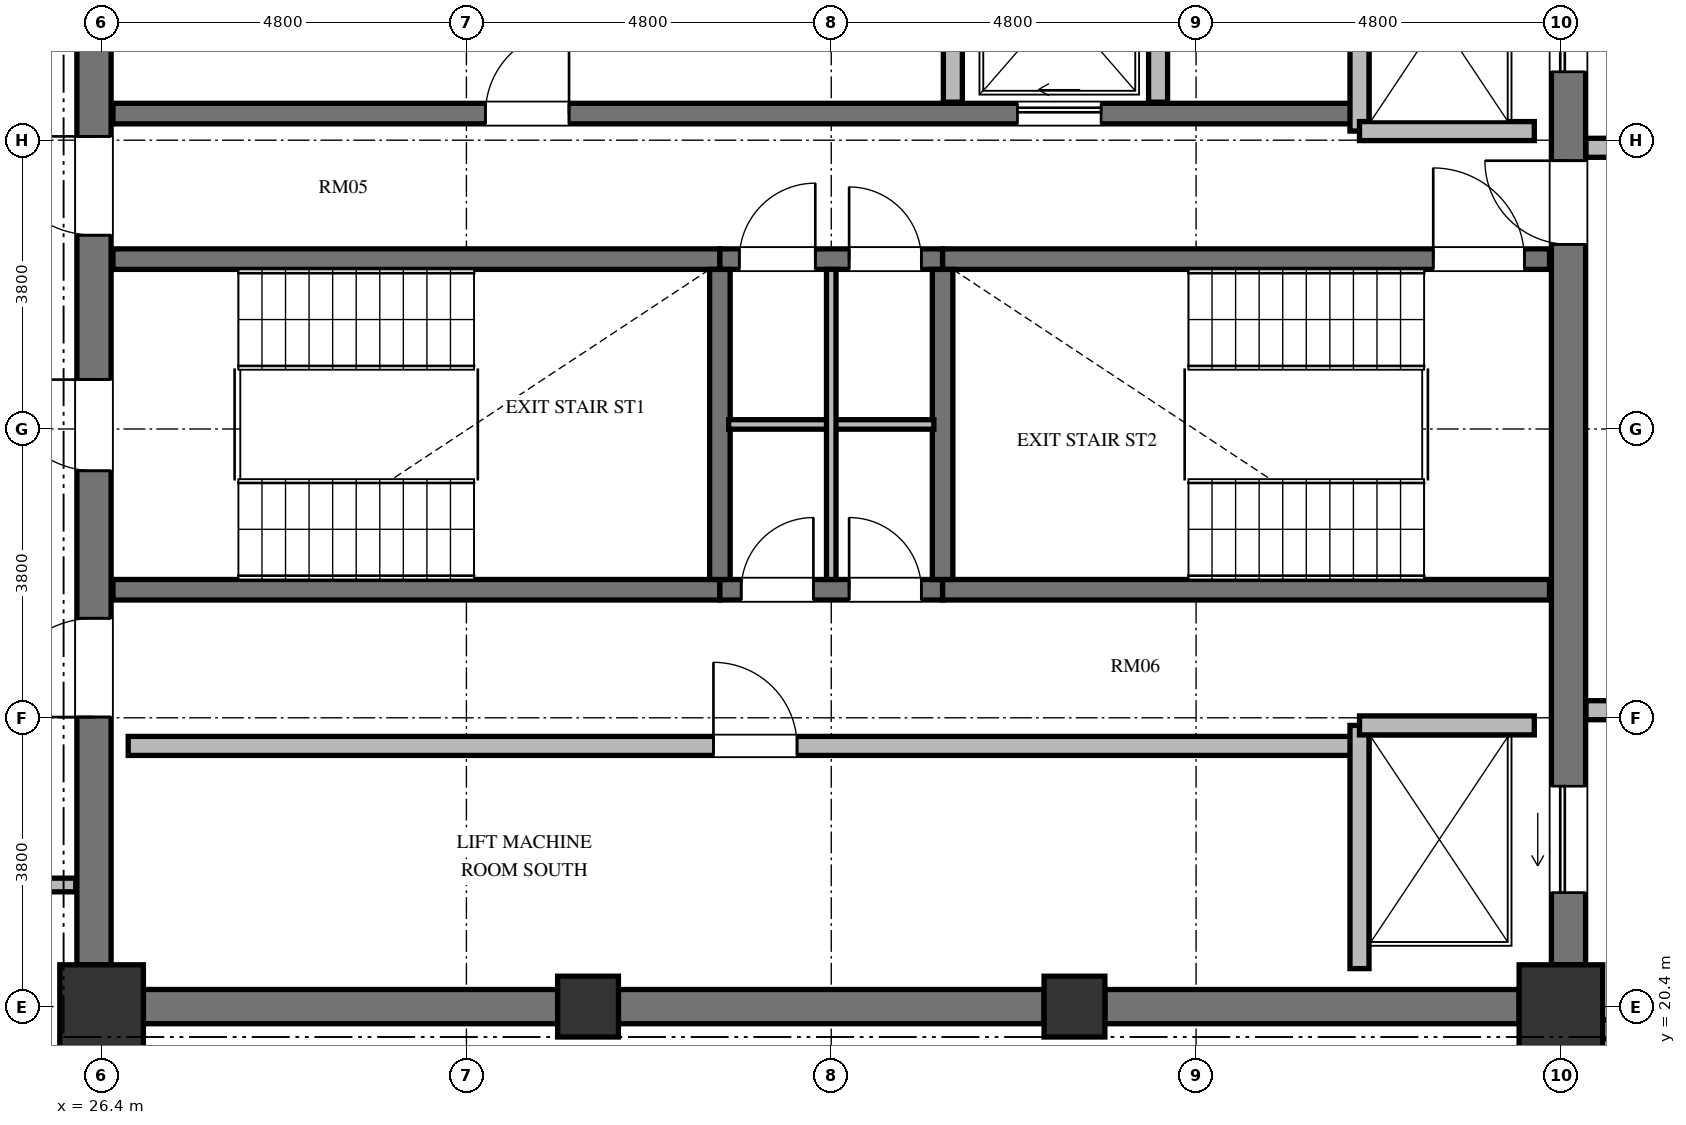
"""IFC4 building model, lengths in metres.
Left out: names, types, materials, properties, quantities, classifications, styles, units other than length and angle.
Written with IfcOpenShell. Run it as: python <this file> out.ifc"""

import sys

from ifc_helpers import new_model, si_unit, direction, frame, frame_2d, origin, origin_2d, place, context, subcontext, project, spatial, rectangle, extrude, element, fill, save


model = new_model("IFC4")
c1 = context("Model", 3, precision=1e-05, world=origin(), true_north=direction((0.0, 1.0)))
c2 = subcontext(c1, "Body", "Model", "MODEL_VIEW")
j1 = project(units=[si_unit("LENGTHUNIT", "METRE"), si_unit("PLANEANGLEUNIT", "RADIAN")], contexts=[c1])
p1 = place(None, origin())
s1 = spatial("IfcSite", under=j1, at=p1, CompositionType="ELEMENT")
p2 = place(p1, origin())
s2 = spatial("IfcBuilding", under=s1, at=p2, CompositionType="ELEMENT")
p3 = place(p2, frame((0.0, 0.0, 305.836)))
s3 = spatial("IfcBuildingStorey", under=s2, at=p3, CompositionType="ELEMENT", Elevation=305.836)
p4 = place(p3, frame((26.4, 20.4, 0.0), z_axis=(0.0, 0.0, 1.0), x_axis=(1.0, 0.0, 0.0)))
e1 = element("IfcColumn", 1, at=p4, inside=s3, PredefinedType="COLUMN", context=c2, shape_type="SweptSolid", body=[
    extrude(rectangle(XDim=1.1, YDim=1.1, at=origin_2d()), origin(), (0.0, 0.0, 1.0), 3.388),
])
for number, where, z_axis, x_axis in (
    (2, (32.8, 20.4, 0.0), (0.0, 0.0, 1.0), (1.0, 0.0, 0.0)),
    (3, (39.2, 20.4, 0.0), (0.0, 0.0, 1.0), (1.0, 0.0, 0.0)),
):
    element("IfcColumn", number, at=place(p3, frame(where, z_axis=z_axis, x_axis=x_axis)), inside=s3, PredefinedType="COLUMN", context=c2, shape_type="SweptSolid", body=[
        extrude(rectangle(XDim=0.8, YDim=0.8, at=origin_2d()), origin(), (0.0, 0.0, 1.0), 3.388),
    ])
p5 = place(p3, frame((45.6, 20.4, 0.0), z_axis=(0.0, 0.0, 1.0), x_axis=(1.0, 0.0, 0.0)))
e4 = element("IfcColumn", 4, at=p5, inside=s3, PredefinedType="COLUMN", context=c2, shape_type="SweptSolid", body=[
    extrude(rectangle(XDim=1.1, YDim=1.1, at=origin_2d()), origin(), (0.0, 0.0, 1.0), 3.388),
])
p6 = place(p3, frame((26.3, 20.95, 0.0), z_axis=(0.0, 0.0, 1.0), x_axis=(0.0, 1.0, 0.0)))
e5 = element("IfcWall", 5, at=p6, inside=s3, PredefinedType="SHEAR", context=c2, shape_type="SweptSolid", body=[
    extrude(rectangle(XDim=14.1, YDim=0.45, at=frame_2d((7.05, 0.0))), origin(), (0.0, 0.0, 1.0), 3.388),
])
p7 = place(p6, frame((6.5, 0.0, 0.0)))
e6 = element("IfcOpeningElement", 6, at=p7, cuts=e5, PredefinedType="OPENING", context=c2, shape_type="SweptSolid", body=[
    extrude(rectangle(XDim=1.2, YDim=2.15, at=frame_2d((0.6, 1.075))), frame((0.0, 0.235, 0.0), z_axis=(0.0, -1.0, 0.0), x_axis=(1.0, 0.0, 0.0)), (0.0, 0.0, 1.0), 0.47),
])
p8 = place(p6, frame((9.6, 0.0, 0.0)))
e7 = element("IfcOpeningElement", 7, at=p8, cuts=e5, PredefinedType="OPENING", context=c2, shape_type="SweptSolid", body=[
    extrude(rectangle(XDim=1.3, YDim=2.2, at=frame_2d((0.65, 1.1))), frame((0.0, 0.235, 0.0), z_axis=(0.0, -1.0, 0.0), x_axis=(1.0, 0.0, 0.0)), (0.0, 0.0, 1.0), 0.47),
])
p9 = place(p6, frame((3.26, 0.0, 0.0)))
e8 = element("IfcOpeningElement", 8, at=p9, cuts=e5, PredefinedType="OPENING", context=c2, shape_type="SweptSolid", body=[
    extrude(rectangle(XDim=1.3, YDim=2.2, at=frame_2d((0.65, 1.1))), frame((0.0, 0.235, 0.0), z_axis=(0.0, -1.0, 0.0), x_axis=(1.0, 0.0, 0.0)), (0.0, 0.0, 1.0), 0.47),
])
p10 = place(p3, frame((45.7, 20.95, 0.0), z_axis=(0.0, 0.0, 1.0), x_axis=(0.0, 1.0, 0.0)))
e9 = element("IfcWall", 9, at=p10, inside=s3, PredefinedType="SHEAR", context=c2, shape_type="SweptSolid", body=[
    extrude(rectangle(XDim=14.1, YDim=0.45, at=frame_2d((7.05, 0.0))), origin(), (0.0, 0.0, 1.0), 3.388),
])
p11 = place(p10, frame((11.75, 0.0, 0.0)))
e10 = element("IfcOpeningElement", 10, at=p11, cuts=e9, PredefinedType="OPENING", context=c2, shape_type="SweptSolid", body=[
    extrude(rectangle(XDim=1.4, YDim=2.3, at=frame_2d((0.7, 1.15))), frame((0.0, 0.235, 0.0), z_axis=(0.0, -1.0, 0.0), x_axis=(1.0, 0.0, 0.0)), (0.0, 0.0, 1.0), 0.47),
])
p12 = place(p10, frame((0.95, 0.0, 0.0)))
e11 = element("IfcOpeningElement", 11, at=p12, cuts=e9, PredefinedType="OPENING", context=c2, shape_type="SweptSolid", body=[
    extrude(rectangle(XDim=1.4, YDim=2.3, at=frame_2d((0.7, 1.15))), frame((0.0, 0.235, 0.0), z_axis=(0.0, -1.0, 0.0), x_axis=(1.0, 0.0, 0.0)), (0.0, 0.0, 1.0), 0.47),
])
p13 = place(p10, frame((9.48, 0.0, 0.0)))
e12 = element("IfcOpeningElement", 12, at=p13, cuts=e9, PredefinedType="OPENING", context=c2, shape_type="SweptSolid", body=[
    extrude(rectangle(XDim=1.1, YDim=2.15, at=frame_2d((0.55, 1.075))), frame((0.0, 0.235, 0.0), z_axis=(0.0, -1.0, 0.0), x_axis=(1.0, 0.0, 0.0)), (0.0, 0.0, 1.0), 0.47),
])
p14 = place(p3, frame((26.95, 20.4, 0.0), z_axis=(0.0, 0.0, 1.0), x_axis=(1.0, 0.0, 0.0)))
e13 = element("IfcWall", 13, at=p14, inside=s3, PredefinedType="SHEAR", context=c2, shape_type="SweptSolid", body=[
    extrude(rectangle(XDim=5.45, YDim=0.45, at=frame_2d((2.725, 0.0))), origin(), (0.0, 0.0, 1.0), 3.388),
])
p15 = place(p3, frame((33.2, 20.4, 0.0), z_axis=(0.0, 0.0, 1.0), x_axis=(1.0, 0.0, 0.0)))
e14 = element("IfcWall", 14, at=p15, inside=s3, PredefinedType="SHEAR", context=c2, shape_type="SweptSolid", body=[
    extrude(rectangle(XDim=5.6, YDim=0.45, at=frame_2d((2.8, 0.0))), origin(), (0.0, 0.0, 1.0), 3.388),
])
p16 = place(p3, frame((39.6, 20.4, 0.0), z_axis=(0.0, 0.0, 1.0), x_axis=(1.0, 0.0, 0.0)))
e15 = element("IfcWall", 15, at=p16, inside=s3, PredefinedType="SHEAR", context=c2, shape_type="SweptSolid", body=[
    extrude(rectangle(XDim=5.45, YDim=0.45, at=frame_2d((2.725, 0.0))), origin(), (0.0, 0.0, 1.0), 3.388),
])
p17 = place(p3, frame((26.55, 30.235, 0.0), z_axis=(0.0, 0.0, 1.0), x_axis=(1.0, 0.0, 0.0)))
e16 = element("IfcWall", 16, at=p17, inside=s3, PredefinedType="SHEAR", context=c2, shape_type="SweptSolid", body=[
    extrude(rectangle(XDim=7.985, YDim=0.27, at=frame_2d((3.992, 0.0))), origin(), (0.0, 0.0, 1.0), 3.388),
])
p18 = place(p3, frame((34.535, 30.235, 0.0), z_axis=(0.0, 0.0, 1.0), x_axis=(1.0, 0.0, 0.0)))
e17 = element("IfcWall", 17, at=p18, inside=s3, PredefinedType="SHEAR", context=c2, shape_type="SweptSolid", body=[
    extrude(rectangle(XDim=2.93, YDim=0.27, at=frame_2d((1.465, 0.0))), origin(), (0.0, 0.0, 1.0), 3.388),
])
p19 = place(p18, frame((0.255, 0.0, 0.0)))
e18 = element("IfcOpeningElement", 18, at=p19, cuts=e17, PredefinedType="OPENING", context=c2, shape_type="SweptSolid", body=[
    extrude(rectangle(XDim=1.0, YDim=2.1, at=frame_2d((0.5, 1.05))), frame((0.0, 0.145, 0.0), z_axis=(0.0, -1.0, 0.0), x_axis=(1.0, 0.0, 0.0)), (0.0, 0.0, 1.0), 0.29),
])
p20 = place(p18, frame((1.7, 0.0, 0.0)))
e19 = element("IfcOpeningElement", 19, at=p20, cuts=e17, PredefinedType="OPENING", context=c2, shape_type="SweptSolid", body=[
    extrude(rectangle(XDim=0.95, YDim=2.1, at=frame_2d((0.475, 1.05))), frame((0.0, 0.145, 0.0), z_axis=(0.0, -1.0, 0.0), x_axis=(1.0, 0.0, 0.0)), (0.0, 0.0, 1.0), 0.29),
])
p21 = place(p3, frame((37.465, 30.235, 0.0), z_axis=(0.0, 0.0, 1.0), x_axis=(1.0, 0.0, 0.0)))
e20 = element("IfcWall", 20, at=p21, inside=s3, PredefinedType="SHEAR", context=c2, shape_type="SweptSolid", body=[
    extrude(rectangle(XDim=7.985, YDim=0.27, at=frame_2d((3.992, 0.0))), origin(), (0.0, 0.0, 1.0), 3.388),
])
p22 = place(p21, frame((6.455, 0.0, 0.0)))
e21 = element("IfcOpeningElement", 21, at=p22, cuts=e20, PredefinedType="OPENING", context=c2, shape_type="SweptSolid", body=[
    extrude(rectangle(XDim=1.2, YDim=2.15, at=frame_2d((0.6, 1.075))), frame((0.0, 0.145, 0.0), z_axis=(0.0, -1.0, 0.0), x_axis=(1.0, 0.0, 0.0)), (0.0, 0.0, 1.0), 0.29),
])
p23 = place(p3, frame((26.55, 25.885, 0.0), z_axis=(0.0, 0.0, 1.0), x_axis=(1.0, 0.0, 0.0)))
e22 = element("IfcWall", 22, at=p23, inside=s3, PredefinedType="SHEAR", context=c2, shape_type="SweptSolid", body=[
    extrude(rectangle(XDim=7.985, YDim=0.27, at=frame_2d((3.992, 0.0))), origin(), (0.0, 0.0, 1.0), 3.388),
])
p24 = place(p3, frame((34.535, 25.885, 0.0), z_axis=(0.0, 0.0, 1.0), x_axis=(1.0, 0.0, 0.0)))
e23 = element("IfcWall", 23, at=p24, inside=s3, PredefinedType="SHEAR", context=c2, shape_type="SweptSolid", body=[
    extrude(rectangle(XDim=2.93, YDim=0.27, at=frame_2d((1.465, 0.0))), origin(), (0.0, 0.0, 1.0), 3.388),
])
p25 = place(p24, frame((0.28, 0.0, 0.0)))
e24 = element("IfcOpeningElement", 24, at=p25, cuts=e23, PredefinedType="OPENING", context=c2, shape_type="SweptSolid", body=[
    extrude(rectangle(XDim=0.95, YDim=2.1, at=frame_2d((0.475, 1.05))), frame((0.0, 0.145, 0.0), z_axis=(0.0, -1.0, 0.0), x_axis=(1.0, 0.0, 0.0)), (0.0, 0.0, 1.0), 0.29),
])
p26 = place(p24, frame((1.7, 0.0, 0.0)))
e25 = element("IfcOpeningElement", 25, at=p26, cuts=e23, PredefinedType="OPENING", context=c2, shape_type="SweptSolid", body=[
    extrude(rectangle(XDim=0.95, YDim=2.1, at=frame_2d((0.475, 1.05))), frame((0.0, 0.145, 0.0), z_axis=(0.0, -1.0, 0.0), x_axis=(1.0, 0.0, 0.0)), (0.0, 0.0, 1.0), 0.29),
])
p27 = place(p3, frame((37.465, 25.885, 0.0), z_axis=(0.0, 0.0, 1.0), x_axis=(1.0, 0.0, 0.0)))
e26 = element("IfcWall", 26, at=p27, inside=s3, PredefinedType="SHEAR", context=c2, shape_type="SweptSolid", body=[
    extrude(rectangle(XDim=7.985, YDim=0.27, at=frame_2d((3.992, 0.0))), origin(), (0.0, 0.0, 1.0), 3.388),
])
for number, where, z_axis, x_axis in (
    (27, (34.535, 26.02, 0.0), (0.0, 0.0, 1.0), (0.0, 1.0, 0.0)),
    (28, (37.465, 26.02, 0.0), (0.0, 0.0, 1.0), (0.0, 1.0, 0.0)),
):
    element("IfcWall", number, at=place(p3, frame(where, z_axis=z_axis, x_axis=x_axis)), inside=s3, PredefinedType="SHEAR", context=c2, shape_type="SweptSolid", body=[
        extrude(rectangle(XDim=4.08, YDim=0.27, at=frame_2d((2.04, 0.0))), origin(), (0.0, 0.0, 1.0), 3.388),
    ])
p28 = place(p3, frame((34.65, 28.06, 0.0), z_axis=(0.0, 0.0, 1.0), x_axis=(1.0, 0.0, 0.0)))
e29 = element("IfcWall", 29, at=p28, inside=s3, PredefinedType="PARTITIONING", context=c2, shape_type="SweptSolid", body=[
    extrude(rectangle(XDim=2.7, YDim=0.125, at=frame_2d((1.35, 0.0))), origin(), (0.0, 0.0, 1.0), 3.068),
])
p29 = place(p3, frame((36.0, 26.02, 0.0), z_axis=(0.0, 0.0, 1.0), x_axis=(0.0, 1.0, 0.0)))
e30 = element("IfcWall", 30, at=p29, inside=s3, PredefinedType="PARTITIONING", context=c2, shape_type="SweptSolid", body=[
    extrude(rectangle(XDim=4.08, YDim=0.125, at=frame_2d((2.04, 0.0))), origin(), (0.0, 0.0, 1.0), 3.068),
])
p30 = place(p3, frame((26.55, 32.15, 0.0), z_axis=(0.0, 0.0, 1.0), x_axis=(1.0, 0.0, 0.0)))
e31 = element("IfcWall", 31, at=p30, inside=s3, PredefinedType="SHEAR", context=c2, shape_type="SweptSolid", body=[
    extrude(rectangle(XDim=16.4, YDim=0.27, at=frame_2d((8.2, 0.0))), origin(), (0.0, 0.0, 1.0), 3.388),
])
p31 = place(p30, frame((4.9, 0.0, 0.0)))
e32 = element("IfcOpeningElement", 32, at=p31, cuts=e31, PredefinedType="OPENING", context=c2, shape_type="SweptSolid", body=[
    extrude(rectangle(XDim=1.1, YDim=2.15, at=frame_2d((0.55, 1.075))), frame((0.0, 0.145, 0.0), z_axis=(0.0, -1.0, 0.0), x_axis=(1.0, 0.0, 0.0)), (0.0, 0.0, 1.0), 0.29),
])
p32 = place(p30, frame((11.9, 0.0, 0.0)))
e33 = element("IfcOpeningElement", 33, at=p32, cuts=e31, PredefinedType="OPENING", context=c2, shape_type="SweptSolid", body=[
    extrude(rectangle(XDim=1.1, YDim=2.2, at=frame_2d((0.55, 1.1))), frame((0.0, 0.145, 0.0), z_axis=(0.0, -1.0, 0.0), x_axis=(1.0, 0.0, 0.0)), (0.0, 0.0, 1.0), 0.29),
])
p33 = place(p3, frame((26.75, 23.83, 0.0), z_axis=(0.0, 0.0, 1.0), x_axis=(1.0, 0.0, 0.0)))
e34 = element("IfcWall", 34, at=p33, inside=s3, PredefinedType="SOLIDWALL", context=c2, shape_type="SweptSolid", body=[
    extrude(rectangle(XDim=16.2, YDim=0.25, at=frame_2d((8.1, 0.0))), origin(), (0.0, 0.0, 1.0), 3.068),
])
p34 = place(p33, frame((7.7, 0.0, 0.0)))
e35 = element("IfcOpeningElement", 35, at=p34, cuts=e34, PredefinedType="OPENING", context=c2, shape_type="SweptSolid", body=[
    extrude(rectangle(XDim=1.1, YDim=2.15, at=frame_2d((0.55, 1.075))), frame((0.0, 0.135, 0.0), z_axis=(0.0, -1.0, 0.0), x_axis=(1.0, 0.0, 0.0)), (0.0, 0.0, 1.0), 0.27),
])
p35 = place(p3, frame((42.95, 31.92, 0.0), z_axis=(0.0, 0.0, 1.0), x_axis=(0.0, 1.0, 0.0)))
e36 = element("IfcWall", 36, at=p35, inside=s3, PredefinedType="SOLIDWALL", context=c2, shape_type="SweptSolid", body=[
    extrude(rectangle(XDim=3.18, YDim=0.25, at=frame_2d((1.59, 0.0))), origin(), (0.0, 0.0, 1.0), 3.068),
])
p36 = place(p3, frame((42.95, 31.92, 0.0), z_axis=(0.0, 0.0, 1.0), x_axis=(1.0, 0.0, 0.0)))
e37 = element("IfcWall", 37, at=p36, inside=s3, PredefinedType="SOLIDWALL", context=c2, shape_type="SweptSolid", body=[
    extrude(rectangle(XDim=2.3, YDim=0.25, at=frame_2d((1.15, 0.0))), origin(), (0.0, 0.0, 1.0), 3.068),
])
p37 = place(p3, frame((42.95, 20.9, 0.0), z_axis=(0.0, 0.0, 1.0), x_axis=(0.0, 1.0, 0.0)))
e38 = element("IfcWall", 38, at=p37, inside=s3, PredefinedType="SOLIDWALL", context=c2, shape_type="SweptSolid", body=[
    extrude(rectangle(XDim=3.2, YDim=0.25, at=frame_2d((1.6, 0.0))), origin(), (0.0, 0.0, 1.0), 3.068),
])
p38 = place(p3, frame((42.95, 24.1, 0.0), z_axis=(0.0, 0.0, 1.0), x_axis=(1.0, 0.0, 0.0)))
e39 = element("IfcWall", 39, at=p38, inside=s3, PredefinedType="SOLIDWALL", context=c2, shape_type="SweptSolid", body=[
    extrude(rectangle(XDim=2.3, YDim=0.25, at=frame_2d((1.15, 0.0))), origin(), (0.0, 0.0, 1.0), 3.068),
])
for number, where, z_axis, x_axis in (
    (40, (37.6, 32.3, 0.0), (0.0, 0.0, 1.0), (0.0, 1.0, 0.0)),
    (41, (40.3, 32.3, 0.0), (0.0, 0.0, 1.0), (0.0, 1.0, 0.0)),
):
    element("IfcWall", number, at=place(p3, frame(where, z_axis=z_axis, x_axis=x_axis)), inside=s3, PredefinedType="SOLIDWALL", context=c2, shape_type="SweptSolid", body=[
        extrude(rectangle(XDim=2.8, YDim=0.25, at=frame_2d((1.4, 0.0))), origin(), (0.0, 0.0, 1.0), 3.068),
    ])
for number, where, z_axis, x_axis in (
    (42, (45.93, 31.7, 0.0), (0.0, 0.0, 1.0), (1.0, 0.0, 0.0)),
    (43, (45.93, 24.3, 0.0), (0.0, 0.0, 1.0), (1.0, 0.0, 0.0)),
    (44, (45.93, 20.1, 0.0), (0.0, 0.0, 1.0), (1.0, 0.0, 0.0)),
):
    element("IfcWall", number, at=place(p3, frame(where, z_axis=z_axis, x_axis=x_axis)), inside=s3, PredefinedType="SOLIDWALL", context=c2, shape_type="SweptSolid", body=[
        extrude(rectangle(XDim=2.52, YDim=0.25, at=frame_2d((1.26, 0.0))), origin(), (0.0, 0.0, 1.0), 3.068),
    ])
p39 = place(p3, frame((26.06, 22.0, 0.0), z_axis=(0.0, 0.0, 1.0), x_axis=(-1.0, 0.0, 0.0)))
e45 = element("IfcWall", 45, at=p39, inside=s3, PredefinedType="PARTITIONING", context=c2, shape_type="SweptSolid", body=[
    extrude(rectangle(XDim=2.447, YDim=0.18, at=frame_2d((1.223, 0.0))), origin(), (0.0, 0.0, 1.0), 3.068),
])
p40 = place(p7, origin())
e46 = element("IfcDoor", 46, at=p40, inside=s3, OperationType="SINGLE_SWING_RIGHT", PredefinedType="DOOR", context=c2, shape_type="SweptSolid", body=[
    extrude(rectangle(XDim=1.2, YDim=2.15, at=frame_2d((0.6, 1.075))), frame((0.0, 0.025, 0.0), z_axis=(0.0, -1.0, 0.0), x_axis=(1.0, 0.0, 0.0)), (0.0, 0.0, 1.0), 0.05),
])
fill(e6, e46)
p41 = place(p22, origin())
e47 = element("IfcDoor", 47, at=p41, inside=s3, OperationType="SINGLE_SWING_LEFT", PredefinedType="DOOR", context=c2, shape_type="SweptSolid", body=[
    extrude(rectangle(XDim=1.2, YDim=2.15, at=frame_2d((0.6, 1.075))), frame((0.0, 0.025, 0.0), z_axis=(0.0, -1.0, 0.0), x_axis=(1.0, 0.0, 0.0)), (0.0, 0.0, 1.0), 0.05),
])
fill(e21, e47)
p42 = place(p25, origin())
e48 = element("IfcDoor", 48, at=p42, inside=s3, OperationType="SINGLE_SWING_RIGHT", PredefinedType="DOOR", context=c2, shape_type="SweptSolid", body=[
    extrude(rectangle(XDim=0.95, YDim=2.1, at=frame_2d((0.475, 1.05))), frame((0.0, 0.025, 0.0), z_axis=(0.0, -1.0, 0.0), x_axis=(1.0, 0.0, 0.0)), (0.0, 0.0, 1.0), 0.05),
])
fill(e24, e48)
p43 = place(p26, origin())
e49 = element("IfcDoor", 49, at=p43, inside=s3, OperationType="SINGLE_SWING_LEFT", PredefinedType="DOOR", context=c2, shape_type="SweptSolid", body=[
    extrude(rectangle(XDim=0.95, YDim=2.1, at=frame_2d((0.475, 1.05))), frame((0.0, 0.025, 0.0), z_axis=(0.0, -1.0, 0.0), x_axis=(1.0, 0.0, 0.0)), (0.0, 0.0, 1.0), 0.05),
])
fill(e25, e49)
p44 = place(p19, origin())
e50 = element("IfcDoor", 50, at=p44, inside=s3, OperationType="SINGLE_SWING_RIGHT", PredefinedType="DOOR", context=c2, shape_type="SweptSolid", body=[
    extrude(rectangle(XDim=1.0, YDim=2.1, at=frame_2d((0.5, 1.05))), frame((0.0, 0.025, 0.0), z_axis=(0.0, -1.0, 0.0), x_axis=(1.0, 0.0, 0.0)), (0.0, 0.0, 1.0), 0.05),
])
fill(e18, e50)
p45 = place(p20, origin())
e51 = element("IfcDoor", 51, at=p45, inside=s3, OperationType="SINGLE_SWING_LEFT", PredefinedType="DOOR", context=c2, shape_type="SweptSolid", body=[
    extrude(rectangle(XDim=0.95, YDim=2.1, at=frame_2d((0.475, 1.05))), frame((0.0, 0.025, 0.0), z_axis=(0.0, -1.0, 0.0), x_axis=(1.0, 0.0, 0.0)), (0.0, 0.0, 1.0), 0.05),
])
fill(e19, e51)
p46 = place(p8, origin())
e52 = element("IfcDoor", 52, at=p46, inside=s3, OperationType="SINGLE_SWING_RIGHT", PredefinedType="DOOR", context=c2, shape_type="SweptSolid", body=[
    extrude(rectangle(XDim=1.3, YDim=2.2, at=frame_2d((0.65, 1.1))), frame((0.0, 0.025, 0.0), z_axis=(0.0, -1.0, 0.0), x_axis=(1.0, 0.0, 0.0)), (0.0, 0.0, 1.0), 0.05),
])
fill(e7, e52)
p47 = place(p9, origin())
e53 = element("IfcDoor", 53, at=p47, inside=s3, OperationType="SINGLE_SWING_LEFT", PredefinedType="DOOR", context=c2, shape_type="SweptSolid", body=[
    extrude(rectangle(XDim=1.3, YDim=2.2, at=frame_2d((0.65, 1.1))), frame((0.0, 0.025, 0.0), z_axis=(0.0, -1.0, 0.0), x_axis=(1.0, 0.0, 0.0)), (0.0, 0.0, 1.0), 0.05),
])
fill(e8, e53)
p48 = place(p31, origin())
e54 = element("IfcDoor", 54, at=p48, inside=s3, OperationType="SINGLE_SWING_RIGHT", PredefinedType="DOOR", context=c2, shape_type="SweptSolid", body=[
    extrude(rectangle(XDim=1.1, YDim=2.15, at=frame_2d((0.55, 1.075))), frame((0.0, 0.025, 0.0), z_axis=(0.0, -1.0, 0.0), x_axis=(1.0, 0.0, 0.0)), (0.0, 0.0, 1.0), 0.05),
])
fill(e32, e54)
p49 = place(p34, origin())
e55 = element("IfcDoor", 55, at=p49, inside=s3, OperationType="SINGLE_SWING_LEFT", PredefinedType="DOOR", context=c2, shape_type="SweptSolid", body=[
    extrude(rectangle(XDim=1.1, YDim=2.15, at=frame_2d((0.55, 1.075))), frame((0.0, 0.025, 0.0), z_axis=(0.0, -1.0, 0.0), x_axis=(1.0, 0.0, 0.0)), (0.0, 0.0, 1.0), 0.05),
])
fill(e35, e55)
p50 = place(p32, origin())
e56 = element("IfcDoor", 56, at=p50, inside=s3, OperationType="SLIDING_TO_LEFT", PredefinedType="DOOR", context=c2, shape_type="SweptSolid", body=[
    extrude(rectangle(XDim=1.1, YDim=2.2, at=frame_2d((0.55, 1.1))), frame((0.0, 0.025, 0.0), z_axis=(0.0, -1.0, 0.0), x_axis=(1.0, 0.0, 0.0)), (0.0, 0.0, 1.0), 0.05),
])
fill(e33, e56)
p51 = place(p11, origin())
e57 = element("IfcDoor", 57, at=p51, inside=s3, OperationType="SLIDING_TO_LEFT", PredefinedType="DOOR", context=c2, shape_type="SweptSolid", body=[
    extrude(rectangle(XDim=1.4, YDim=2.3, at=frame_2d((0.7, 1.15))), frame((0.0, 0.025, 0.0), z_axis=(0.0, -1.0, 0.0), x_axis=(1.0, 0.0, 0.0)), (0.0, 0.0, 1.0), 0.05),
])
fill(e10, e57)
p52 = place(p12, origin())
e58 = element("IfcDoor", 58, at=p52, inside=s3, OperationType="SLIDING_TO_LEFT", PredefinedType="DOOR", context=c2, shape_type="SweptSolid", body=[
    extrude(rectangle(XDim=1.4, YDim=2.3, at=frame_2d((0.7, 1.15))), frame((0.0, 0.025, 0.0), z_axis=(0.0, -1.0, 0.0), x_axis=(1.0, 0.0, 0.0)), (0.0, 0.0, 1.0), 0.05),
])
fill(e11, e58)
p53 = place(p13, origin())
e59 = element("IfcDoor", 59, at=p53, inside=s3, OperationType="SINGLE_SWING_RIGHT", PredefinedType="DOOR", context=c2, shape_type="SweptSolid", body=[
    extrude(rectangle(XDim=1.1, YDim=2.15, at=frame_2d((0.55, 1.075))), frame((0.0, 0.025, 0.0), z_axis=(0.0, -1.0, 0.0), x_axis=(1.0, 0.0, 0.0)), (0.0, 0.0, 1.0), 0.05),
])
fill(e12, e59)
save(model, sys.argv[1])
